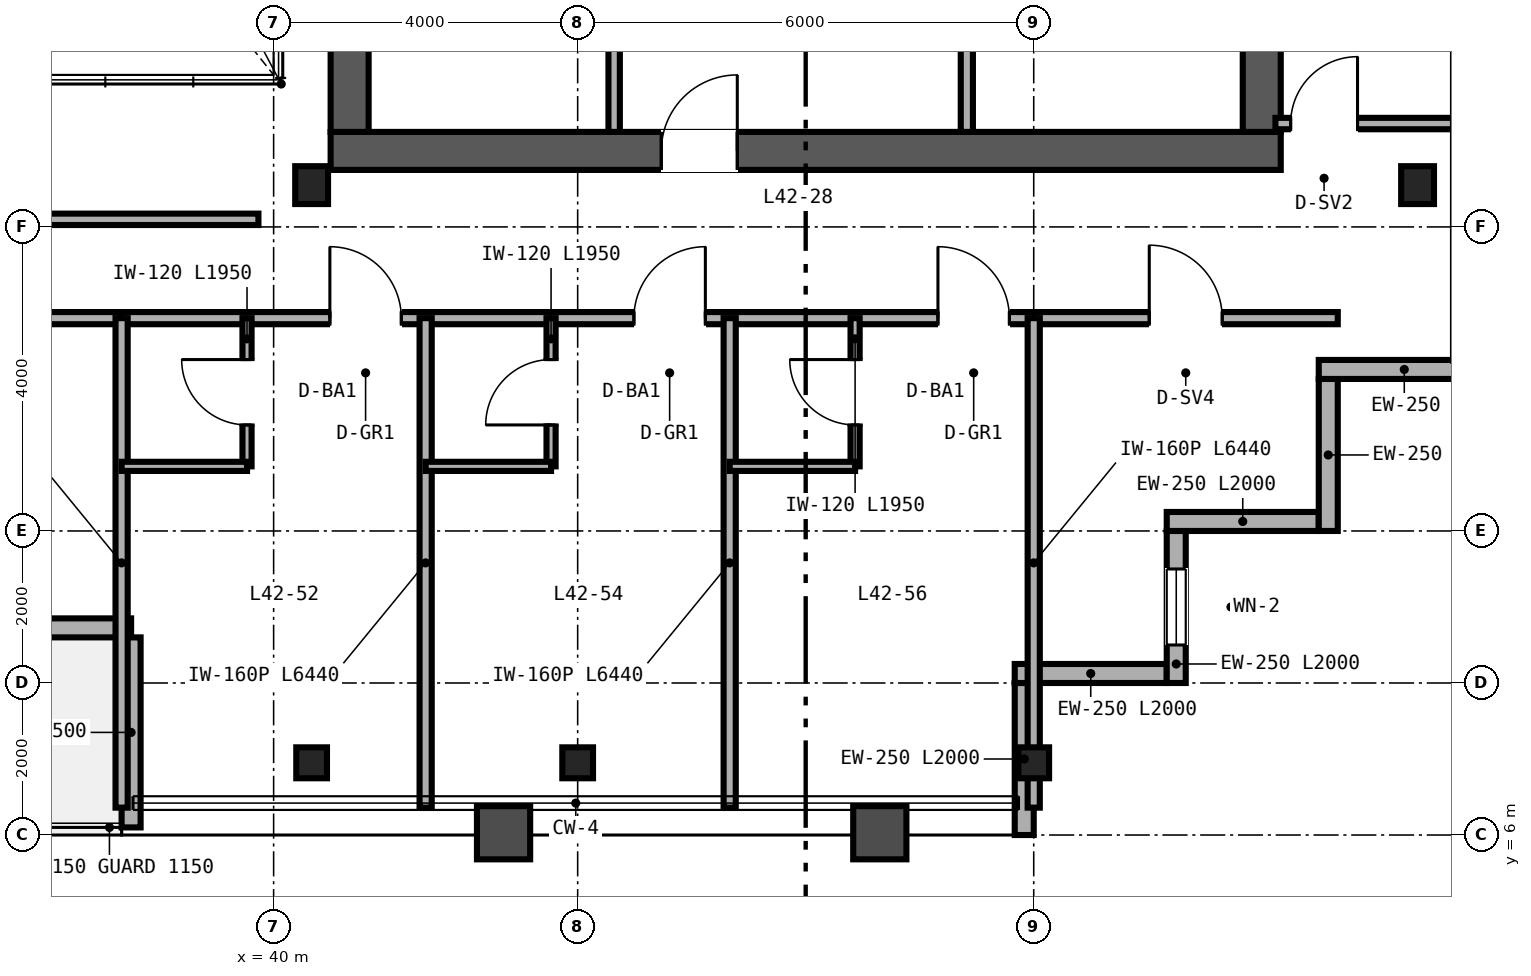
"""IFC4 building model, lengths in metres.
Left out: names, types, materials, properties, quantities, classifications, styles, units other than length and angle.
Written with IfcOpenShell. Run it as: python <this file> out.ifc"""

import sys

from ifc_helpers import new_model, si_unit, direction, frame, frame_2d, origin, origin_2d, place, context, subcontext, project, spatial, rectangle, i_section, extrude, source, transform, mapped, element, fill, save


model = new_model("IFC4")
c1 = context("Model", 3, precision=1e-05, world=origin(), true_north=direction((0.0, 1.0)))
c2 = subcontext(c1, "Body", "Model", "MODEL_VIEW")
j1 = project(units=[si_unit("LENGTHUNIT", "METRE"), si_unit("PLANEANGLEUNIT", "RADIAN")], contexts=[c1])
p1 = place(None, origin())
s1 = spatial("IfcSite", under=j1, at=p1, CompositionType="ELEMENT")
p2 = place(p1, origin())
s2 = spatial("IfcBuilding", under=s1, at=p2, CompositionType="ELEMENT")
p3 = place(p2, frame((0.0, 0.0, 170.4)))
s3 = spatial("IfcBuildingStorey", under=s2, at=p3, CompositionType="ELEMENT", Elevation=170.4)
p4 = place(p3, frame((40.75, 15.0, 0.0), z_axis=(0.0, 0.0, 1.0), x_axis=(1.0, 0.0, 0.0)))
e1 = element("IfcWall", 1, at=p4, inside=s3, PredefinedType="SHEAR", context=c2, shape_type="SweptSolid", body=[
    extrude(rectangle(XDim=12.5, YDim=0.5, at=frame_2d((6.25, 0.0))), origin(), (0.0, 0.0, 1.0), 3.37),
])
p5 = place(p4, frame((4.35, 0.0, 0.0)))
e2 = element("IfcOpeningElement", 2, at=p5, cuts=e1, PredefinedType="OPENING", context=c2, shape_type="SweptSolid", body=[
    extrude(rectangle(XDim=1.0, YDim=2.15, at=frame_2d((0.5, 1.075))), frame((0.0, 0.26, 0.0), z_axis=(0.0, -1.0, 0.0), x_axis=(1.0, 0.0, 0.0)), (0.0, 0.0, 1.0), 0.52),
])
for number, where, z_axis, x_axis in (
    (3, (41.0, 15.25, 0.0), (0.0, 0.0, 1.0), (0.0, 1.0, 0.0)),
    (4, (53.0, 15.25, 0.0), (0.0, 0.0, 1.0), (0.0, 1.0, 0.0)),
):
    element("IfcWall", number, at=place(p3, frame(where, z_axis=z_axis, x_axis=x_axis)), inside=s3, PredefinedType="SHEAR", context=c2, shape_type="SweptSolid", body=[
        extrude(rectangle(XDim=21.5, YDim=0.5, at=frame_2d((10.75, 0.0))), origin(), (0.0, 0.0, 1.0), 3.37),
    ])
m1 = source(origin(), c2, "Body", "SweptSolid", [
    extrude(i_section(OverallWidth=0.432, OverallDepth=0.498, WebThickness=0.056, FlangeThickness=0.089, FilletRadius=0.025, at=origin_2d()), origin(), (0.0, 0.0, 1.0), 3.37),
])
for number, where, z_axis, x_axis in (
    (5, (40.5, 14.55, 0.0), (0.0, 0.0, 1.0), (1.0, 0.0, 0.0)),
    (6, (55.05, 14.55, 0.0), (0.0, 0.0, 1.0), (1.0, 0.0, 0.0)),
):
    element("IfcColumn", number, at=place(p3, frame(where, z_axis=z_axis, x_axis=x_axis)), inside=s3, PredefinedType="COLUMN", context=c2, shape_type="MappedRepresentation", body=[
        mapped(m1, transform((0.0, 0.0, 0.0), scale=1.0)),
    ])
m2 = source(origin(), c2, "Body", "SweptSolid", [
    extrude(i_section(OverallWidth=0.404, OverallDepth=0.407, WebThickness=0.027, FlangeThickness=0.044, FilletRadius=0.025, at=origin_2d()), origin(), (0.0, 0.0, 1.0), 3.37),
])
for number, where, z_axis, x_axis in (
    (7, (40.5, 6.95, 0.0), (0.0, 0.0, 1.0), (1.0, 0.0, 0.0)),
    (8, (44.0, 6.95, 0.0), (0.0, 0.0, 1.0), (1.0, 0.0, 0.0)),
    (9, (50.0, 6.95, 0.0), (0.0, 0.0, 1.0), (1.0, 0.0, 0.0)),
):
    element("IfcColumn", number, at=place(p3, frame(where, z_axis=z_axis, x_axis=x_axis)), inside=s3, PredefinedType="COLUMN", context=c2, shape_type="MappedRepresentation", body=[
        mapped(m2, transform((0.0, 0.0, 0.0), scale=1.0)),
    ])
p6 = place(p3, frame((49.875, 6.0, 0.0), z_axis=(0.0, 0.0, 1.0), x_axis=(0.0, 1.0, 0.0)))
e10 = element("IfcWall", 10, at=p6, inside=s3, PredefinedType="SOLIDWALL", context=c2, shape_type="SweptSolid", body=[
    extrude(rectangle(XDim=2.0, YDim=0.25, at=frame_2d((1.0, 0.0))), origin(), (0.0, 0.0, 1.0), 2.677),
])
p7 = place(p3, frame((49.75, 8.125, 0.0), z_axis=(0.0, 0.0, 1.0), x_axis=(1.0, 0.0, 0.0)))
e11 = element("IfcWall", 11, at=p7, inside=s3, PredefinedType="SOLIDWALL", context=c2, shape_type="SweptSolid", body=[
    extrude(rectangle(XDim=2.0, YDim=0.25, at=frame_2d((1.0, 0.0))), origin(), (0.0, 0.0, 1.0), 3.37),
])
p8 = place(p3, frame((51.875, 8.0, 0.0), z_axis=(0.0, 0.0, 1.0), x_axis=(0.0, 1.0, 0.0)))
e12 = element("IfcWall", 12, at=p8, inside=s3, PredefinedType="SOLIDWALL", context=c2, shape_type="SweptSolid", body=[
    extrude(rectangle(XDim=2.0, YDim=0.25, at=frame_2d((1.0, 0.0))), origin(), (0.0, 0.0, 1.0), 3.37),
])
p9 = place(p8, frame((0.5, 0.0, 0.85)))
e13 = element("IfcOpeningElement", 13, at=p9, cuts=e12, PredefinedType="OPENING", context=c2, shape_type="SweptSolid", body=[
    extrude(rectangle(XDim=1.0, YDim=1.9, at=frame_2d((0.5, 0.95))), frame((0.0, 0.135, 0.0), z_axis=(0.0, -1.0, 0.0), x_axis=(1.0, 0.0, 0.0)), (0.0, 0.0, 1.0), 0.27),
])
for number, where, z_axis, x_axis in (
    (14, (51.75, 10.125, 0.0), (0.0, 0.0, 1.0), (1.0, 0.0, 0.0)),
    (15, (53.875, 10.0, 0.0), (0.0, 0.0, 1.0), (0.0, 1.0, 0.0)),
):
    element("IfcWall", number, at=place(p3, frame(where, z_axis=z_axis, x_axis=x_axis)), inside=s3, PredefinedType="SOLIDWALL", context=c2, shape_type="SweptSolid", body=[
        extrude(rectangle(XDim=2.0, YDim=0.25, at=frame_2d((1.0, 0.0))), origin(), (0.0, 0.0, 1.0), 3.37),
    ])
p10 = place(p3, frame((53.75, 12.125, 0.0), z_axis=(0.0, 0.0, 1.0), x_axis=(1.0, 0.0, 0.0)))
e16 = element("IfcWall", 16, at=p10, inside=s3, PredefinedType="SOLIDWALL", context=c2, shape_type="SweptSolid", body=[
    extrude(rectangle(XDim=2.25, YDim=0.25, at=frame_2d((1.125, 0.0))), origin(), (0.0, 0.0, 1.0), 3.37),
])
p11 = place(p3, frame((25.875, 8.725, 0.0), z_axis=(0.0, 0.0, 1.0), x_axis=(1.0, 0.0, 0.0)))
e17 = element("IfcWall", 17, at=p11, inside=s3, PredefinedType="SOLIDWALL", context=c2, shape_type="SweptSolid", body=[
    extrude(rectangle(XDim=12.25, YDim=0.25, at=frame_2d((6.125, 0.0))), origin(), (0.0, 0.0, 1.0), 3.37),
])
p12 = place(p11, frame((5.6, 0.0, 0.0)))
e18 = element("IfcOpeningElement", 18, at=p12, cuts=e17, PredefinedType="OPENING", context=c2, shape_type="SweptSolid", body=[
    extrude(rectangle(XDim=1.05, YDim=2.15, at=frame_2d((0.525, 1.075))), frame((0.0, 0.135, 0.0), z_axis=(0.0, -1.0, 0.0), x_axis=(1.0, 0.0, 0.0)), (0.0, 0.0, 1.0), 0.27),
])
p13 = place(p3, frame((38.125, 6.1, 0.0), z_axis=(0.0, 0.0, 1.0), x_axis=(0.0, 1.0, 0.0)))
e19 = element("IfcWall", 19, at=p13, inside=s3, PredefinedType="SOLIDWALL", context=c2, shape_type="SweptSolid", body=[
    extrude(rectangle(XDim=2.5, YDim=0.25, at=frame_2d((1.25, 0.0))), origin(), (0.0, 0.0, 1.0), 2.443),
])
p14 = place(p3, frame((49.12, 15.25, 0.0), z_axis=(0.0, 0.0, 1.0), x_axis=(0.0, 1.0, 0.0)))
e20 = element("IfcWall", 20, at=p14, inside=s3, PredefinedType="PARTITIONING", context=c2, shape_type="SweptSolid", body=[
    extrude(rectangle(XDim=16.13, YDim=0.16, at=frame_2d((8.065, 0.0))), origin(), (0.0, 0.0, 1.0), 2.443),
])
p15 = place(p14, frame((2.2, 0.0, 0.0)))
e21 = element("IfcOpeningElement", 21, at=p15, cuts=e20, PredefinedType="OPENING", context=c2, shape_type="SweptSolid", body=[
    extrude(rectangle(XDim=0.9, YDim=2.15, at=frame_2d((0.45, 1.075))), frame((0.0, 0.09, 0.0), z_axis=(0.0, -1.0, 0.0), x_axis=(1.0, 0.0, 0.0)), (0.0, 0.0, 1.0), 0.18),
])
p16 = place(p14, frame((8.2, 0.0, 0.0)))
e22 = element("IfcOpeningElement", 22, at=p16, cuts=e20, PredefinedType="OPENING", context=c2, shape_type="SweptSolid", body=[
    extrude(rectangle(XDim=0.9, YDim=2.15, at=frame_2d((0.45, 1.075))), frame((0.0, 0.09, 0.0), z_axis=(0.0, -1.0, 0.0), x_axis=(1.0, 0.0, 0.0)), (0.0, 0.0, 1.0), 0.18),
])
p17 = place(p14, frame((13.5, 0.0, 0.0)))
e23 = element("IfcOpeningElement", 23, at=p17, cuts=e20, PredefinedType="OPENING", context=c2, shape_type="SweptSolid", body=[
    extrude(rectangle(XDim=0.9, YDim=2.15, at=frame_2d((0.45, 1.075))), frame((0.0, 0.09, 0.0), z_axis=(0.0, -1.0, 0.0), x_axis=(1.0, 0.0, 0.0)), (0.0, 0.0, 1.0), 0.18),
])
p18 = place(p3, frame((44.48, 15.25, 0.0), z_axis=(0.0, 0.0, 1.0), x_axis=(0.0, 1.0, 0.0)))
e24 = element("IfcWall", 24, at=p18, inside=s3, PredefinedType="PARTITIONING", context=c2, shape_type="SweptSolid", body=[
    extrude(rectangle(XDim=11.63, YDim=0.15, at=frame_2d((5.815, 0.0))), origin(), (0.0, 0.0, 1.0), 3.37),
])
p19 = place(p18, frame((2.2, 0.0, 0.0)))
e25 = element("IfcOpeningElement", 25, at=p19, cuts=e24, PredefinedType="OPENING", context=c2, shape_type="SweptSolid", body=[
    extrude(rectangle(XDim=0.9, YDim=2.15, at=frame_2d((0.45, 1.075))), frame((0.0, 0.085, 0.0), z_axis=(0.0, -1.0, 0.0), x_axis=(1.0, 0.0, 0.0)), (0.0, 0.0, 1.0), 0.17),
])
p20 = place(p18, frame((7.87, 0.0, 0.0)))
e26 = element("IfcOpeningElement", 26, at=p20, cuts=e24, PredefinedType="OPENING", context=c2, shape_type="SweptSolid", body=[
    extrude(rectangle(XDim=0.9, YDim=2.15, at=frame_2d((0.45, 1.075))), frame((0.0, 0.085, 0.0), z_axis=(0.0, -1.0, 0.0), x_axis=(1.0, 0.0, 0.0)), (0.0, 0.0, 1.0), 0.17),
])
p21 = place(p3, frame((24.2, 14.1, 0.0), z_axis=(0.0, 0.0, 1.0), x_axis=(1.0, 0.0, 0.0)))
e27 = element("IfcWall", 27, at=p21, inside=s3, PredefinedType="PARTITIONING", context=c2, shape_type="SweptSolid", body=[
    extrude(rectangle(XDim=15.6, YDim=0.15, at=frame_2d((7.8, 0.0))), origin(), (0.0, 0.0, 1.0), 3.37),
])
p22 = place(p21, frame((7.0, 0.0, 0.0)))
e28 = element("IfcOpeningElement", 28, at=p22, cuts=e27, PredefinedType="OPENING", context=c2, shape_type="SweptSolid", body=[
    extrude(rectangle(XDim=0.96, YDim=2.15, at=frame_2d((0.48, 1.075))), frame((0.0, 0.085, 0.0), z_axis=(0.0, -1.0, 0.0), x_axis=(1.0, 0.0, 0.0)), (0.0, 0.0, 1.0), 0.17),
])
p23 = place(p3, frame((53.18, 15.36, 0.0), z_axis=(0.0, 0.0, 1.0), x_axis=(1.0, 0.0, 0.0)))
e29 = element("IfcWall", 29, at=p23, inside=s3, PredefinedType="PARTITIONING", context=c2, shape_type="SweptSolid", body=[
    extrude(rectangle(XDim=2.66, YDim=0.15, at=frame_2d((1.33, 0.0))), origin(), (0.0, 0.0, 1.0), 2.591),
])
p24 = place(p23, frame((0.2, 0.0, 0.0)))
e30 = element("IfcOpeningElement", 30, at=p24, cuts=e29, PredefinedType="OPENING", context=c2, shape_type="SweptSolid", body=[
    extrude(rectangle(XDim=0.88, YDim=2.15, at=frame_2d((0.44, 1.075))), frame((0.0, 0.085, 0.0), z_axis=(0.0, -1.0, 0.0), x_axis=(1.0, 0.0, 0.0)), (0.0, 0.0, 1.0), 0.17),
])
p25 = place(p3, frame((50.0, 12.8, 0.0), z_axis=(0.0, 0.0, 1.0), x_axis=(1.0, 0.0, 0.0)))
e31 = element("IfcWall", 31, at=p25, inside=s3, PredefinedType="PARTITIONING", context=c2, shape_type="SweptSolid", body=[
    extrude(rectangle(XDim=4.0, YDim=0.16, at=frame_2d((2.0, 0.0))), origin(), (0.0, 0.0, 1.0), 3.37),
])
p26 = place(p25, frame((1.52, 0.0, 0.0)))
e32 = element("IfcOpeningElement", 32, at=p26, cuts=e31, PredefinedType="OPENING", context=c2, shape_type="SweptSolid", body=[
    extrude(rectangle(XDim=0.96, YDim=2.15, at=frame_2d((0.48, 1.075))), frame((0.0, 0.09, 0.0), z_axis=(0.0, -1.0, 0.0), x_axis=(1.0, 0.0, 0.0)), (0.0, 0.0, 1.0), 0.18),
])
p27 = place(p3, frame((26.0, 12.8, 0.0), z_axis=(0.0, 0.0, 1.0), x_axis=(1.0, 0.0, 0.0)))
e33 = element("IfcWall", 33, at=p27, inside=s3, PredefinedType="PARTITIONING", context=c2, shape_type="SweptSolid", body=[
    extrude(rectangle(XDim=12.0, YDim=0.16, at=frame_2d((6.0, 0.0))), origin(), (0.0, 0.0, 1.0), 3.37),
])
p28 = place(p27, frame((5.2, 0.0, 0.0)))
e34 = element("IfcOpeningElement", 34, at=p28, cuts=e33, PredefinedType="OPENING", context=c2, shape_type="SweptSolid", body=[
    extrude(rectangle(XDim=0.96, YDim=2.15, at=frame_2d((0.48, 1.075))), frame((0.0, 0.09, 0.0), z_axis=(0.0, -1.0, 0.0), x_axis=(1.0, 0.0, 0.0)), (0.0, 0.0, 1.0), 0.18),
])
p29 = place(p3, frame((38.0, 12.8, 0.0), z_axis=(0.0, 0.0, 1.0), x_axis=(1.0, 0.0, 0.0)))
e35 = element("IfcWall", 35, at=p29, inside=s3, PredefinedType="PARTITIONING", context=c2, shape_type="SweptSolid", body=[
    extrude(rectangle(XDim=12.0, YDim=0.16, at=frame_2d((6.0, 0.0))), origin(), (0.0, 0.0, 1.0), 2.913),
])
p30 = place(p29, frame((2.74, 0.0, 0.0)))
e36 = element("IfcOpeningElement", 36, at=p30, cuts=e35, PredefinedType="OPENING", context=c2, shape_type="SweptSolid", body=[
    extrude(rectangle(XDim=0.94, YDim=2.15, at=frame_2d((0.47, 1.075))), frame((0.0, 0.09, 0.0), z_axis=(0.0, -1.0, 0.0), x_axis=(1.0, 0.0, 0.0)), (0.0, 0.0, 1.0), 0.18),
])
p31 = place(p29, frame((6.74, 0.0, 0.0)))
e37 = element("IfcOpeningElement", 37, at=p31, cuts=e35, PredefinedType="OPENING", context=c2, shape_type="SweptSolid", body=[
    extrude(rectangle(XDim=0.94, YDim=2.15, at=frame_2d((0.47, 1.075))), frame((0.0, 0.09, 0.0), z_axis=(0.0, -1.0, 0.0), x_axis=(1.0, 0.0, 0.0)), (0.0, 0.0, 1.0), 0.18),
])
p32 = place(p29, frame((10.74, 0.0, 0.0)))
e38 = element("IfcOpeningElement", 38, at=p32, cuts=e35, PredefinedType="OPENING", context=c2, shape_type="SweptSolid", body=[
    extrude(rectangle(XDim=0.94, YDim=2.15, at=frame_2d((0.47, 1.075))), frame((0.0, 0.09, 0.0), z_axis=(0.0, -1.0, 0.0), x_axis=(1.0, 0.0, 0.0)), (0.0, 0.0, 1.0), 0.18),
])
p33 = place(p3, frame((38.0, 6.36, 0.0), z_axis=(0.0, 0.0, 1.0), x_axis=(0.0, 1.0, 0.0)))
e39 = element("IfcWall", 39, at=p33, inside=s3, PredefinedType="PARTITIONING", context=c2, shape_type="SweptSolid", body=[
    extrude(rectangle(XDim=6.44, YDim=0.16, at=frame_2d((3.22, 0.0))), origin(), (0.0, 0.0, 1.0), 2.443),
])
p34 = place(p3, frame((50.0, 6.36, 0.0), z_axis=(0.0, 0.0, 1.0), x_axis=(0.0, 1.0, 0.0)))
e40 = element("IfcWall", 40, at=p34, inside=s3, PredefinedType="PARTITIONING", context=c2, shape_type="SweptSolid", body=[
    extrude(rectangle(XDim=6.44, YDim=0.16, at=frame_2d((3.22, 0.0))), origin(), (0.0, 0.0, 1.0), 2.677),
])
p35 = place(p3, frame((42.0, 6.36, 0.0), z_axis=(0.0, 0.0, 1.0), x_axis=(0.0, 1.0, 0.0)))
e41 = element("IfcWall", 41, at=p35, inside=s3, PredefinedType="PARTITIONING", context=c2, shape_type="SweptSolid", body=[
    extrude(rectangle(XDim=6.44, YDim=0.16, at=frame_2d((3.22, 0.0))), origin(), (0.0, 0.0, 1.0), 2.833),
])
p36 = place(p3, frame((39.65, 10.85, 0.0), z_axis=(0.0, 0.0, 1.0), x_axis=(0.0, 1.0, 0.0)))
e42 = element("IfcWall", 42, at=p36, inside=s3, PredefinedType="PARTITIONING", context=c2, shape_type="SweptSolid", body=[
    extrude(rectangle(XDim=1.95, YDim=0.12, at=frame_2d((0.975, 0.0))), origin(), (0.0, 0.0, 1.0), 3.37),
])
p37 = place(p36, frame((0.545, 0.0, 0.0)))
e43 = element("IfcOpeningElement", 43, at=p37, cuts=e42, PredefinedType="OPENING", context=c2, shape_type="SweptSolid", body=[
    extrude(rectangle(XDim=0.86, YDim=2.1, at=frame_2d((0.43, 1.05))), frame((0.0, 0.07, 0.0), z_axis=(0.0, -1.0, 0.0), x_axis=(1.0, 0.0, 0.0)), (0.0, 0.0, 1.0), 0.14),
])
p38 = place(p3, frame((38.0, 10.85, 0.0), z_axis=(0.0, 0.0, 1.0), x_axis=(1.0, 0.0, 0.0)))
e44 = element("IfcWall", 44, at=p38, inside=s3, PredefinedType="PARTITIONING", context=c2, shape_type="SweptSolid", body=[
    extrude(rectangle(XDim=1.65, YDim=0.12, at=frame_2d((0.825, 0.0))), origin(), (0.0, 0.0, 1.0), 3.37),
])
p39 = place(p3, frame((46.0, 6.36, 0.0), z_axis=(0.0, 0.0, 1.0), x_axis=(0.0, 1.0, 0.0)))
e45 = element("IfcWall", 45, at=p39, inside=s3, PredefinedType="PARTITIONING", context=c2, shape_type="SweptSolid", body=[
    extrude(rectangle(XDim=6.44, YDim=0.16, at=frame_2d((3.22, 0.0))), origin(), (0.0, 0.0, 1.0), 2.677),
])
p40 = place(p3, frame((43.65, 10.85, 0.0), z_axis=(0.0, 0.0, 1.0), x_axis=(0.0, 1.0, 0.0)))
e46 = element("IfcWall", 46, at=p40, inside=s3, PredefinedType="PARTITIONING", context=c2, shape_type="SweptSolid", body=[
    extrude(rectangle(XDim=1.95, YDim=0.12, at=frame_2d((0.975, 0.0))), origin(), (0.0, 0.0, 1.0), 3.37),
])
p41 = place(p40, frame((0.545, 0.0, 0.0)))
e47 = element("IfcOpeningElement", 47, at=p41, cuts=e46, PredefinedType="OPENING", context=c2, shape_type="SweptSolid", body=[
    extrude(rectangle(XDim=0.86, YDim=2.1, at=frame_2d((0.43, 1.05))), frame((0.0, 0.07, 0.0), z_axis=(0.0, -1.0, 0.0), x_axis=(1.0, 0.0, 0.0)), (0.0, 0.0, 1.0), 0.14),
])
p42 = place(p3, frame((42.0, 10.85, 0.0), z_axis=(0.0, 0.0, 1.0), x_axis=(1.0, 0.0, 0.0)))
e48 = element("IfcWall", 48, at=p42, inside=s3, PredefinedType="PARTITIONING", context=c2, shape_type="SweptSolid", body=[
    extrude(rectangle(XDim=1.65, YDim=0.12, at=frame_2d((0.825, 0.0))), origin(), (0.0, 0.0, 1.0), 3.37),
])
p43 = place(p3, frame((47.65, 10.85, 0.0), z_axis=(0.0, 0.0, 1.0), x_axis=(0.0, 1.0, 0.0)))
e49 = element("IfcWall", 49, at=p43, inside=s3, PredefinedType="PARTITIONING", context=c2, shape_type="SweptSolid", body=[
    extrude(rectangle(XDim=1.95, YDim=0.12, at=frame_2d((0.975, 0.0))), origin(), (0.0, 0.0, 1.0), 3.37),
])
p44 = place(p43, frame((0.545, 0.0, 0.0)))
e50 = element("IfcOpeningElement", 50, at=p44, cuts=e49, PredefinedType="OPENING", context=c2, shape_type="SweptSolid", body=[
    extrude(rectangle(XDim=0.86, YDim=2.1, at=frame_2d((0.43, 1.05))), frame((0.0, 0.07, 0.0), z_axis=(0.0, -1.0, 0.0), x_axis=(1.0, 0.0, 0.0)), (0.0, 0.0, 1.0), 0.14),
])
p45 = place(p3, frame((46.0, 10.85, 0.0), z_axis=(0.0, 0.0, 1.0), x_axis=(1.0, 0.0, 0.0)))
e51 = element("IfcWall", 51, at=p45, inside=s3, PredefinedType="PARTITIONING", context=c2, shape_type="SweptSolid", body=[
    extrude(rectangle(XDim=1.65, YDim=0.12, at=frame_2d((0.825, 0.0))), origin(), (0.0, 0.0, 1.0), 3.37),
])
m3 = source(origin(), c2, "Body", "SweptSolid", [
    extrude(rectangle(XDim=1.0, YDim=1.9, at=frame_2d((0.5, 0.95))), frame((0.0, 0.03, 0.0), z_axis=(0.0, -1.0, 0.0), x_axis=(1.0, 0.0, 0.0)), (0.0, 0.0, 1.0), 0.06),
])
p46 = place(p9, origin())
e52 = element("IfcWindow", 52, at=p46, inside=s3, PartitioningType="SINGLE_PANEL", PredefinedType="WINDOW", context=c2, shape_type="MappedRepresentation", body=[
    mapped(m3, transform((0.0, 0.0, 0.0), scale=1.0)),
])
fill(e13, e52)
m4 = source(origin(), c2, "Body", "SweptSolid", [
    extrude(rectangle(XDim=1.0, YDim=2.15, at=frame_2d((0.5, 1.075))), frame((0.0, 0.025, 0.0), z_axis=(0.0, -1.0, 0.0), x_axis=(1.0, 0.0, 0.0)), (0.0, 0.0, 1.0), 0.05),
])
p47 = place(p5, origin())
e53 = element("IfcDoor", 53, at=p47, inside=s3, OperationType="SINGLE_SWING_RIGHT", PredefinedType="DOOR", context=c2, shape_type="MappedRepresentation", body=[
    mapped(m4, transform((0.0, 0.0, 0.0), scale=1.0)),
])
fill(e2, e53)
m5 = source(origin(), c2, "Body", "SweptSolid", [
    extrude(rectangle(XDim=0.88, YDim=2.15, at=frame_2d((0.44, 1.075))), frame((0.0, 0.025, 0.0), z_axis=(0.0, -1.0, 0.0), x_axis=(1.0, 0.0, 0.0)), (0.0, 0.0, 1.0), 0.05),
])
p48 = place(p24, origin())
e54 = element("IfcDoor", 54, at=p48, inside=s3, OperationType="SINGLE_SWING_RIGHT", PredefinedType="DOOR", context=c2, shape_type="MappedRepresentation", body=[
    mapped(m5, transform((0.0, 0.0, 0.0), scale=1.0)),
])
fill(e30, e54)
m6 = source(origin(), c2, "Body", "SweptSolid", [
    extrude(rectangle(XDim=0.96, YDim=2.15, at=frame_2d((0.48, 1.075))), frame((0.0, 0.025, 0.0), z_axis=(0.0, -1.0, 0.0), x_axis=(1.0, 0.0, 0.0)), (0.0, 0.0, 1.0), 0.05),
])
p49 = place(p26, origin())
e55 = element("IfcDoor", 55, at=p49, inside=s3, OperationType="SINGLE_SWING_LEFT", PredefinedType="DOOR", context=c2, shape_type="MappedRepresentation", body=[
    mapped(m6, transform((0.0, 0.0, 0.0), scale=1.0)),
])
fill(e32, e55)
m7 = source(origin(), c2, "Body", "SweptSolid", [
    extrude(rectangle(XDim=0.86, YDim=2.1, at=frame_2d((0.43, 1.05))), frame((0.0, 0.025, 0.0), z_axis=(0.0, -1.0, 0.0), x_axis=(1.0, 0.0, 0.0)), (0.0, 0.0, 1.0), 0.05),
])
p50 = place(p37, origin())
e56 = element("IfcDoor", 56, at=p50, inside=s3, OperationType="SINGLE_SWING_RIGHT", PredefinedType="DOOR", context=c2, shape_type="MappedRepresentation", body=[
    mapped(m7, transform((0.0, 0.0, 0.0), scale=1.0)),
])
fill(e43, e56)
p51 = place(p41, origin())
e57 = element("IfcDoor", 57, at=p51, inside=s3, OperationType="SINGLE_SWING_LEFT", PredefinedType="DOOR", context=c2, shape_type="MappedRepresentation", body=[
    mapped(m7, transform((0.0, 0.0, 0.0), scale=1.0)),
])
fill(e47, e57)
p52 = place(p44, origin())
e58 = element("IfcDoor", 58, at=p52, inside=s3, OperationType="SINGLE_SWING_RIGHT", PredefinedType="DOOR", context=c2, shape_type="MappedRepresentation", body=[
    mapped(m7, transform((0.0, 0.0, 0.0), scale=1.0)),
])
fill(e50, e58)
m8 = source(origin(), c2, "Body", "SweptSolid", [
    extrude(rectangle(XDim=0.94, YDim=2.15, at=frame_2d((0.47, 1.075))), frame((0.0, 0.025, 0.0), z_axis=(0.0, -1.0, 0.0), x_axis=(1.0, 0.0, 0.0)), (0.0, 0.0, 1.0), 0.05),
])
p53 = place(p30, origin())
e59 = element("IfcDoor", 59, at=p53, inside=s3, OperationType="SINGLE_SWING_LEFT", PredefinedType="DOOR", context=c2, shape_type="MappedRepresentation", body=[
    mapped(m8, transform((0.0, 0.0, 0.0), scale=1.0)),
])
fill(e36, e59)
p54 = place(p31, origin())
e60 = element("IfcDoor", 60, at=p54, inside=s3, OperationType="SINGLE_SWING_RIGHT", PredefinedType="DOOR", context=c2, shape_type="MappedRepresentation", body=[
    mapped(m8, transform((0.0, 0.0, 0.0), scale=1.0)),
])
fill(e37, e60)
p55 = place(p32, origin())
e61 = element("IfcDoor", 61, at=p55, inside=s3, OperationType="SINGLE_SWING_LEFT", PredefinedType="DOOR", context=c2, shape_type="MappedRepresentation", body=[
    mapped(m8, transform((0.0, 0.0, 0.0), scale=1.0)),
])
fill(e38, e61)
save(model, sys.argv[1])
